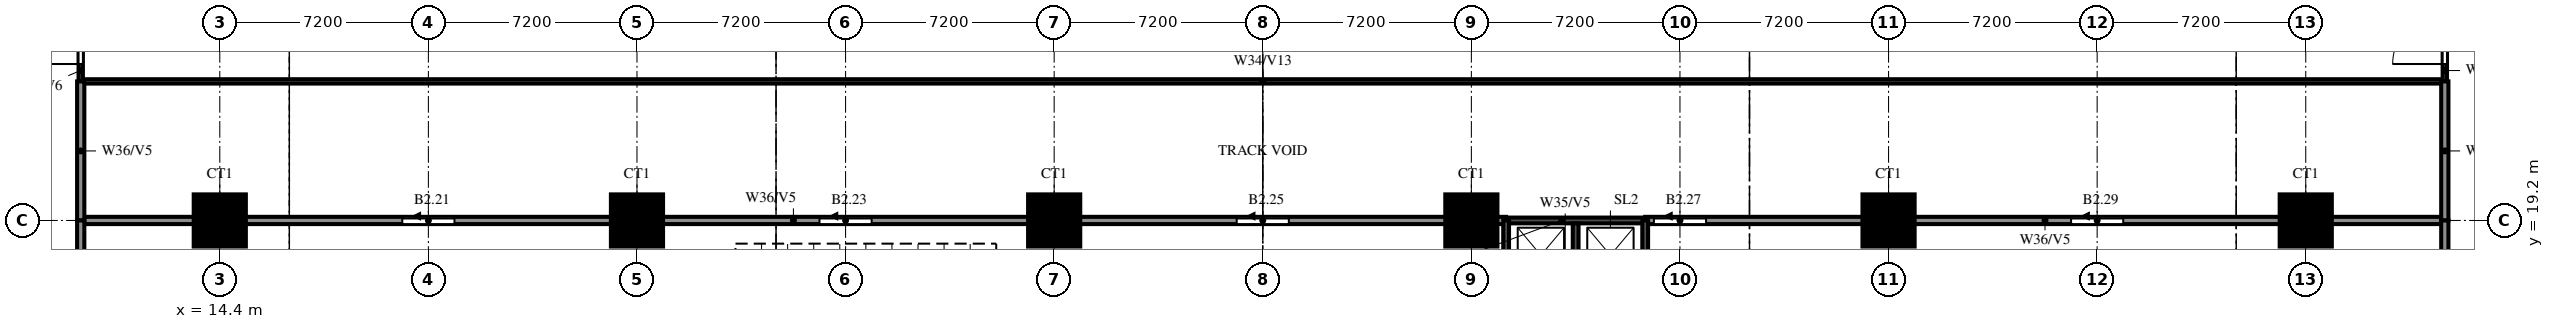
"""IFC4 building model, lengths in metres.
Left out: names, types, materials, properties, quantities, classifications, styles, units other than length and angle.
Written with IfcOpenShell. Run it as: python <this file> out.ifc"""

import sys

from ifc_helpers import new_model, si_unit, direction, frame, frame_2d, origin, origin_2d, place, context, subcontext, project, spatial, rectangle, extrude, source, transform, mapped, element, fill, save


model = new_model("IFC4")
c1 = context("Model", 3, precision=1e-05, world=origin(), true_north=direction((0.0, 1.0)))
c2 = subcontext(c1, "Body", "Model", "MODEL_VIEW")
j1 = project(units=[si_unit("LENGTHUNIT", "METRE"), si_unit("PLANEANGLEUNIT", "RADIAN")], contexts=[c1])
p1 = place(None, origin())
s1 = spatial("IfcSite", under=j1, at=p1, CompositionType="ELEMENT")
p2 = place(p1, origin())
s2 = spatial("IfcBuilding", under=s1, at=p2, CompositionType="ELEMENT")
p3 = place(p2, frame((0.0, 0.0, -11.4)))
s3 = spatial("IfcBuildingStorey", under=s2, at=p3, CompositionType="ELEMENT", Elevation=-11.4)
m1 = source(origin(), c2, "Body", "SweptSolid", [
    extrude(rectangle(XDim=1.8, YDim=1.8, at=origin_2d()), origin(), (0.0, 0.0, 1.0), 5.6),
])
for number, where, z_axis, x_axis in (
    (1, (14.4, 19.2, 0.0), (0.0, 0.0, 1.0), (1.0, 0.0, 0.0)),
    (2, (28.8, 19.2, 0.0), (0.0, 0.0, 1.0), (1.0, 0.0, 0.0)),
    (3, (43.2, 19.2, 0.0), (0.0, 0.0, 1.0), (1.0, 0.0, 0.0)),
    (4, (57.6, 19.2, 0.0), (0.0, 0.0, 1.0), (1.0, 0.0, 0.0)),
    (5, (72.0, 19.2, 0.0), (0.0, 0.0, 1.0), (1.0, 0.0, 0.0)),
    (6, (86.4, 19.2, 0.0), (0.0, 0.0, 1.0), (1.0, 0.0, 0.0)),
):
    element("IfcColumn", number, at=place(p3, frame(where, z_axis=z_axis, x_axis=x_axis)), inside=s3, PredefinedType="COLUMN", context=c2, shape_type="MappedRepresentation", body=[
        mapped(m1, transform((0.0, 0.0, 0.0))),
    ])
p4 = place(p3, frame((58.8, 19.2, 0.0), z_axis=(0.0, 0.0, 1.0), x_axis=(1.0, 0.0, 0.0)))
e7 = element("IfcWall", 7, at=p4, inside=s3, PredefinedType="SOLIDWALL", context=c2, shape_type="SweptSolid", body=[
    extrude(rectangle(XDim=4.8, YDim=0.2, at=frame_2d((2.4, 0.0))), origin(), (0.0, 0.0, 1.0), 5.6),
])
p5 = place(p3, frame((9.6, 19.2, 0.0), z_axis=(0.0, 0.0, 1.0), x_axis=(1.0, 0.0, 0.0)))
e8 = element("IfcWall", 8, at=p5, inside=s3, PredefinedType="SOLIDWALL", context=c2, shape_type="SweptSolid", body=[
    extrude(rectangle(XDim=49.2, YDim=0.25, at=frame_2d((24.6, 0.0))), origin(), (0.0, 0.0, 1.0), 2.2),
])
p6 = place(p5, frame((11.1, 0.0, 0.0)))
e9 = element("IfcOpeningElement", 9, at=p6, cuts=e8, PredefinedType="OPENING", context=c2, shape_type="SweptSolid", body=[
    extrude(rectangle(XDim=1.8, YDim=2.1, at=frame_2d((0.9, 1.05))), frame((0.0, 0.135, 0.0), z_axis=(0.0, -1.0, 0.0), x_axis=(1.0, 0.0, 0.0)), (0.0, 0.0, 1.0), 0.27),
])
p7 = place(p5, frame((25.5, 0.0, 0.0)))
e10 = element("IfcOpeningElement", 10, at=p7, cuts=e8, PredefinedType="OPENING", context=c2, shape_type="SweptSolid", body=[
    extrude(rectangle(XDim=1.8, YDim=2.1, at=frame_2d((0.9, 1.05))), frame((0.0, 0.135, 0.0), z_axis=(0.0, -1.0, 0.0), x_axis=(1.0, 0.0, 0.0)), (0.0, 0.0, 1.0), 0.27),
])
p8 = place(p5, frame((39.9, 0.0, 0.0)))
e11 = element("IfcOpeningElement", 11, at=p8, cuts=e8, PredefinedType="OPENING", context=c2, shape_type="SweptSolid", body=[
    extrude(rectangle(XDim=1.8, YDim=2.1, at=frame_2d((0.9, 1.05))), frame((0.0, 0.135, 0.0), z_axis=(0.0, -1.0, 0.0), x_axis=(1.0, 0.0, 0.0)), (0.0, 0.0, 1.0), 0.27),
])
p9 = place(p3, frame((63.6, 19.2, 0.0), z_axis=(0.0, 0.0, 1.0), x_axis=(1.0, 0.0, 0.0)))
e12 = element("IfcWall", 12, at=p9, inside=s3, PredefinedType="SOLIDWALL", context=c2, shape_type="SweptSolid", body=[
    extrude(rectangle(XDim=27.6, YDim=0.25, at=frame_2d((13.8, 0.0))), origin(), (0.0, 0.0, 1.0), 2.2),
])
p10 = place(p9, frame((0.3, 0.0, 0.0)))
e13 = element("IfcOpeningElement", 13, at=p10, cuts=e12, PredefinedType="OPENING", context=c2, shape_type="SweptSolid", body=[
    extrude(rectangle(XDim=1.8, YDim=2.1, at=frame_2d((0.9, 1.05))), frame((0.0, 0.135, 0.0), z_axis=(0.0, -1.0, 0.0), x_axis=(1.0, 0.0, 0.0)), (0.0, 0.0, 1.0), 0.27),
])
p11 = place(p9, frame((14.7, 0.0, 0.0)))
e14 = element("IfcOpeningElement", 14, at=p11, cuts=e12, PredefinedType="OPENING", context=c2, shape_type="SweptSolid", body=[
    extrude(rectangle(XDim=1.8, YDim=2.1, at=frame_2d((0.9, 1.05))), frame((0.0, 0.135, 0.0), z_axis=(0.0, -1.0, 0.0), x_axis=(1.0, 0.0, 0.0)), (0.0, 0.0, 1.0), 0.27),
])
p12 = place(p3, frame((9.6, 24.0, 0.0), z_axis=(0.0, 0.0, 1.0), x_axis=(1.0, 0.0, 0.0)))
e15 = element("IfcWall", 15, at=p12, inside=s3, PredefinedType="PARTITIONING", context=c2, shape_type="SweptSolid", body=[
    extrude(rectangle(XDim=81.6, YDim=0.15, at=frame_2d((40.8, 0.0))), origin(), (0.0, 0.0, 1.0), 4.4),
])
p13 = place(p3, frame((9.6, 24.0, 0.0), z_axis=(0.0, 0.0, 1.0), x_axis=(0.0, 1.0, 0.0)))
e16 = element("IfcWall", 16, at=p13, inside=s3, PredefinedType="PARTITIONING", context=c2, shape_type="SweptSolid", body=[
    extrude(rectangle(XDim=3.0, YDim=0.15, at=frame_2d((1.5, 0.0))), origin(), (0.0, 0.0, 1.0), 5.6),
])
p14 = place(p13, frame((0.6, 0.0, 0.0)))
e17 = element("IfcOpeningElement", 17, at=p14, cuts=e16, PredefinedType="OPENING", context=c2, shape_type="SweptSolid", body=[
    extrude(rectangle(XDim=1.8, YDim=2.1, at=frame_2d((0.9, 1.05))), frame((0.0, 0.085, 0.0), z_axis=(0.0, -1.0, 0.0), x_axis=(1.0, 0.0, 0.0)), (0.0, 0.0, 1.0), 0.17),
])
p15 = place(p3, frame((9.6, 19.2, 0.0), z_axis=(0.0, 0.0, 1.0), x_axis=(0.0, 1.0, 0.0)))
e18 = element("IfcWall", 18, at=p15, inside=s3, PredefinedType="SOLIDWALL", context=c2, shape_type="SweptSolid", body=[
    extrude(rectangle(XDim=4.8, YDim=0.25, at=frame_2d((2.4, 0.0))), origin(), (0.0, 0.0, 1.0), 2.2),
])
p16 = place(p3, frame((9.6, 9.6, 0.0), z_axis=(0.0, 0.0, 1.0), x_axis=(0.0, 1.0, 0.0)))
e19 = element("IfcWall", 19, at=p16, inside=s3, PredefinedType="SOLIDWALL", context=c2, shape_type="SweptSolid", body=[
    extrude(rectangle(XDim=9.6, YDim=0.25, at=frame_2d((4.8, 0.0))), origin(), (0.0, 0.0, 1.0), 2.2),
])
p17 = place(p16, frame((3.9, 0.0, 0.0)))
e20 = element("IfcOpeningElement", 20, at=p17, cuts=e19, PredefinedType="OPENING", context=c2, shape_type="SweptSolid", body=[
    extrude(rectangle(XDim=1.8, YDim=2.1, at=frame_2d((0.9, 1.05))), frame((0.0, 0.135, 0.0), z_axis=(0.0, -1.0, 0.0), x_axis=(1.0, 0.0, 0.0)), (0.0, 0.0, 1.0), 0.27),
])
p18 = place(p3, frame((58.8, 16.8, 0.0), z_axis=(0.0, 0.0, 1.0), x_axis=(0.0, 1.0, 0.0)))
e21 = element("IfcWall", 21, at=p18, inside=s3, PredefinedType="SOLIDWALL", context=c2, shape_type="SweptSolid", body=[
    extrude(rectangle(XDim=2.4, YDim=0.2, at=frame_2d((1.2, 0.0))), origin(), (0.0, 0.0, 1.0), 5.6),
])
p19 = place(p3, frame((61.2, 16.9, 0.0), z_axis=(0.0, 0.0, 1.0), x_axis=(0.0, 1.0, 0.0)))
e22 = element("IfcWall", 22, at=p19, inside=s3, PredefinedType="SOLIDWALL", context=c2, shape_type="SweptSolid", body=[
    extrude(rectangle(XDim=2.2, YDim=0.2, at=frame_2d((1.1, 0.0))), origin(), (0.0, 0.0, 1.0), 5.6),
])
p20 = place(p3, frame((63.6, 16.8, 0.0), z_axis=(0.0, 0.0, 1.0), x_axis=(0.0, 1.0, 0.0)))
e23 = element("IfcWall", 23, at=p20, inside=s3, PredefinedType="SOLIDWALL", context=c2, shape_type="SweptSolid", body=[
    extrude(rectangle(XDim=2.4, YDim=0.2, at=frame_2d((1.2, 0.0))), origin(), (0.0, 0.0, 1.0), 5.6),
])
p21 = place(p3, frame((91.2, 24.0, 0.0), z_axis=(0.0, 0.0, 1.0), x_axis=(0.0, 1.0, 0.0)))
e24 = element("IfcWall", 24, at=p21, inside=s3, PredefinedType="PARTITIONING", context=c2, shape_type="SweptSolid", body=[
    extrude(rectangle(XDim=3.0, YDim=0.15, at=frame_2d((1.5, 0.0))), origin(), (0.0, 0.0, 1.0), 5.6),
])
p22 = place(p21, frame((0.6, 0.0, 0.0)))
e25 = element("IfcOpeningElement", 25, at=p22, cuts=e24, PredefinedType="OPENING", context=c2, shape_type="SweptSolid", body=[
    extrude(rectangle(XDim=1.8, YDim=2.1, at=frame_2d((0.9, 1.05))), frame((0.0, 0.085, 0.0), z_axis=(0.0, -1.0, 0.0), x_axis=(1.0, 0.0, 0.0)), (0.0, 0.0, 1.0), 0.17),
])
p23 = place(p3, frame((91.2, 19.2, 0.0), z_axis=(0.0, 0.0, 1.0), x_axis=(0.0, 1.0, 0.0)))
e26 = element("IfcWall", 26, at=p23, inside=s3, PredefinedType="SOLIDWALL", context=c2, shape_type="SweptSolid", body=[
    extrude(rectangle(XDim=4.8, YDim=0.25, at=frame_2d((2.4, 0.0))), origin(), (0.0, 0.0, 1.0), 2.2),
])
p24 = place(p3, frame((91.2, 9.6, 0.0), z_axis=(0.0, 0.0, 1.0), x_axis=(0.0, 1.0, 0.0)))
e27 = element("IfcWall", 27, at=p24, inside=s3, PredefinedType="SOLIDWALL", context=c2, shape_type="SweptSolid", body=[
    extrude(rectangle(XDim=9.6, YDim=0.25, at=frame_2d((4.8, 0.0))), origin(), (0.0, 0.0, 1.0), 2.2),
])
p25 = place(p24, frame((3.9, 0.0, 0.0)))
e28 = element("IfcOpeningElement", 28, at=p25, cuts=e27, PredefinedType="OPENING", context=c2, shape_type="SweptSolid", body=[
    extrude(rectangle(XDim=1.8, YDim=2.1, at=frame_2d((0.9, 1.05))), frame((0.0, 0.135, 0.0), z_axis=(0.0, -1.0, 0.0), x_axis=(1.0, 0.0, 0.0)), (0.0, 0.0, 1.0), 0.27),
])
p26 = place(p14, origin())
e29 = element("IfcDoor", 29, at=p26, inside=s3, OperationType="DOUBLE_DOOR_SINGLE_SWING", PredefinedType="DOOR", context=c2, shape_type="SweptSolid", body=[
    extrude(rectangle(XDim=1.8, YDim=2.1, at=frame_2d((0.9, 1.05))), frame((0.0, 0.025, 0.0), z_axis=(0.0, -1.0, 0.0), x_axis=(1.0, 0.0, 0.0)), (0.0, 0.0, 1.0), 0.05),
])
fill(e17, e29)
p27 = place(p22, origin())
e30 = element("IfcDoor", 30, at=p27, inside=s3, OperationType="DOUBLE_DOOR_SINGLE_SWING", PredefinedType="DOOR", context=c2, shape_type="SweptSolid", body=[
    extrude(rectangle(XDim=1.8, YDim=2.1, at=frame_2d((0.9, 1.05))), frame((0.0, 0.025, 0.0), z_axis=(0.0, -1.0, 0.0), x_axis=(1.0, 0.0, 0.0)), (0.0, 0.0, 1.0), 0.05),
])
fill(e25, e30)
p28 = place(p6, origin())
e31 = element("IfcDoor", 31, at=p28, inside=s3, OperationType="SLIDING_TO_LEFT", PredefinedType="DOOR", context=c2, shape_type="SweptSolid", body=[
    extrude(rectangle(XDim=1.8, YDim=2.1, at=frame_2d((0.9, 1.05))), frame((0.0, 0.025, 0.0), z_axis=(0.0, -1.0, 0.0), x_axis=(1.0, 0.0, 0.0)), (0.0, 0.0, 1.0), 0.05),
])
fill(e9, e31)
p29 = place(p7, origin())
e32 = element("IfcDoor", 32, at=p29, inside=s3, OperationType="SLIDING_TO_LEFT", PredefinedType="DOOR", context=c2, shape_type="SweptSolid", body=[
    extrude(rectangle(XDim=1.8, YDim=2.1, at=frame_2d((0.9, 1.05))), frame((0.0, 0.025, 0.0), z_axis=(0.0, -1.0, 0.0), x_axis=(1.0, 0.0, 0.0)), (0.0, 0.0, 1.0), 0.05),
])
fill(e10, e32)
p30 = place(p8, origin())
e33 = element("IfcDoor", 33, at=p30, inside=s3, OperationType="SLIDING_TO_LEFT", PredefinedType="DOOR", context=c2, shape_type="SweptSolid", body=[
    extrude(rectangle(XDim=1.8, YDim=2.1, at=frame_2d((0.9, 1.05))), frame((0.0, 0.025, 0.0), z_axis=(0.0, -1.0, 0.0), x_axis=(1.0, 0.0, 0.0)), (0.0, 0.0, 1.0), 0.05),
])
fill(e11, e33)
p31 = place(p10, origin())
e34 = element("IfcDoor", 34, at=p31, inside=s3, OperationType="SLIDING_TO_LEFT", PredefinedType="DOOR", context=c2, shape_type="SweptSolid", body=[
    extrude(rectangle(XDim=1.8, YDim=2.1, at=frame_2d((0.9, 1.05))), frame((0.0, 0.025, 0.0), z_axis=(0.0, -1.0, 0.0), x_axis=(1.0, 0.0, 0.0)), (0.0, 0.0, 1.0), 0.05),
])
fill(e13, e34)
p32 = place(p11, origin())
e35 = element("IfcDoor", 35, at=p32, inside=s3, OperationType="SLIDING_TO_LEFT", PredefinedType="DOOR", context=c2, shape_type="SweptSolid", body=[
    extrude(rectangle(XDim=1.8, YDim=2.1, at=frame_2d((0.9, 1.05))), frame((0.0, 0.025, 0.0), z_axis=(0.0, -1.0, 0.0), x_axis=(1.0, 0.0, 0.0)), (0.0, 0.0, 1.0), 0.05),
])
fill(e14, e35)
save(model, sys.argv[1])
